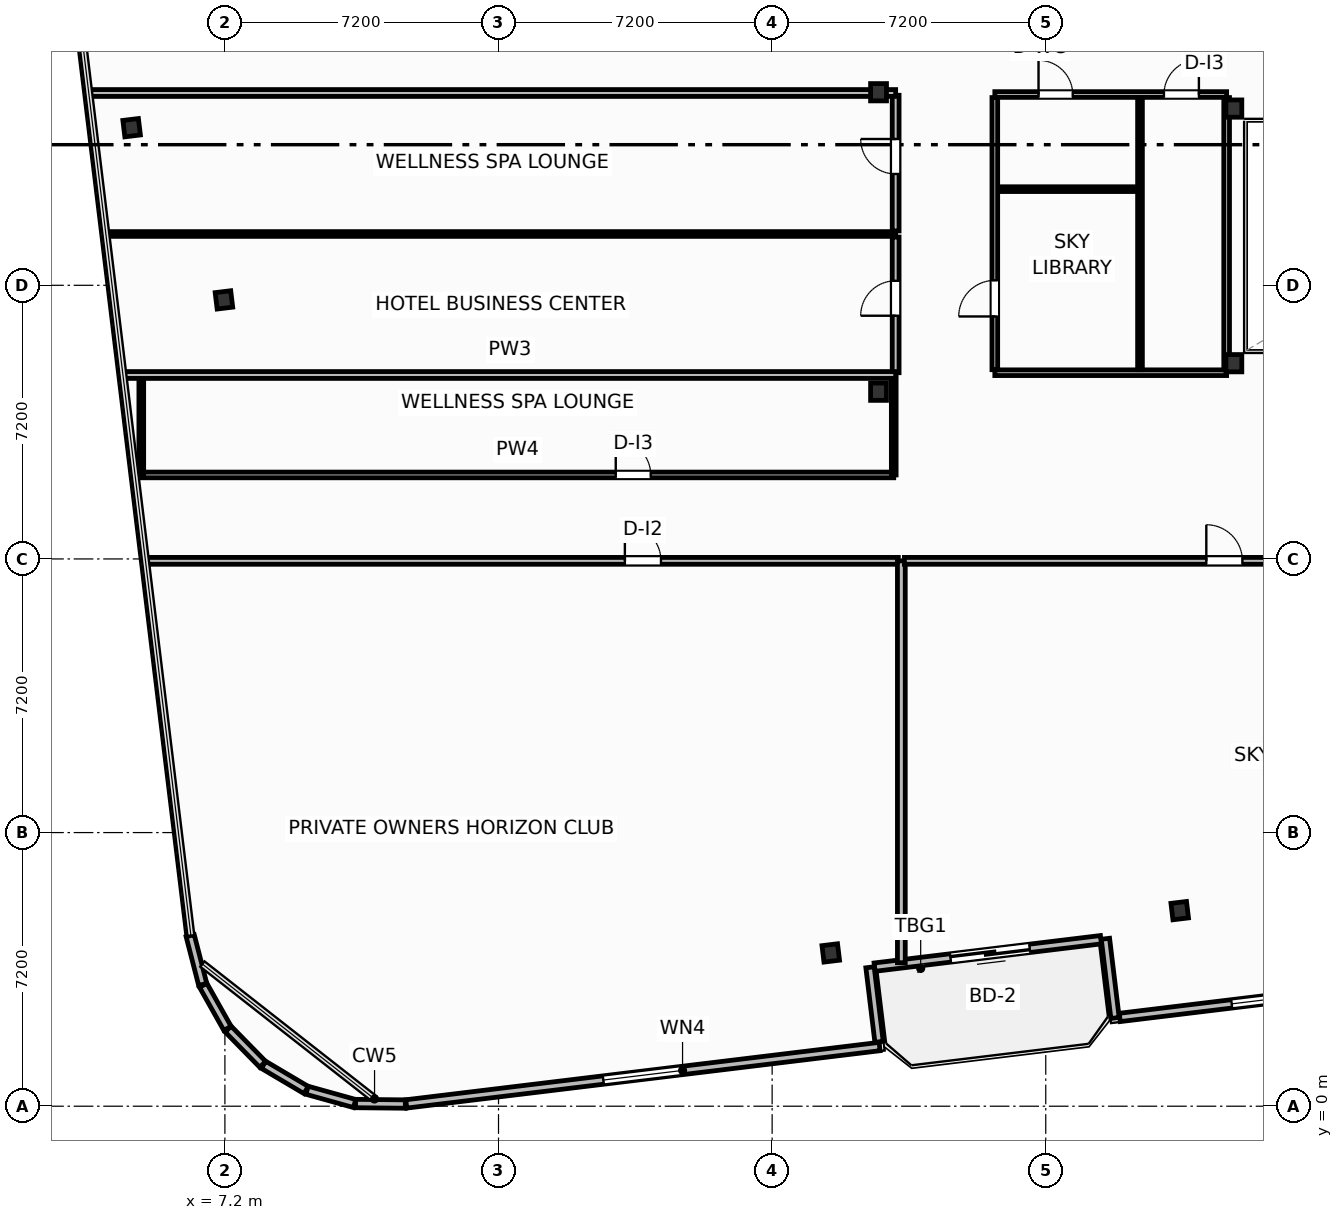
"""IFC4 building model, lengths in metres.
Left out: names, types, materials, properties, quantities, classifications, styles, units other than length and angle.
Written with IfcOpenShell. Run it as: python <this file> out.ifc"""

import sys

from ifc_helpers import new_model, si_unit, direction, frame, frame_2d, origin, origin_2d, place, context, subcontext, project, spatial, rectangle, i_section, extrude, element, fill, save


model = new_model("IFC4")
c1 = context("Model", 3, precision=1e-05, world=origin(), true_north=direction((0.0, 1.0)))
c2 = subcontext(c1, "Body", "Model", "MODEL_VIEW")
j1 = project(units=[si_unit("LENGTHUNIT", "METRE"), si_unit("PLANEANGLEUNIT", "RADIAN")], contexts=[c1])
p1 = place(None, origin())
s1 = spatial("IfcSite", under=j1, at=p1, CompositionType="ELEMENT")
p2 = place(p1, origin())
s2 = spatial("IfcBuilding", under=s1, at=p2, CompositionType="ELEMENT")
p3 = place(p2, frame((0.0, 0.0, 182.0)))
s3 = spatial("IfcBuildingStorey", under=s2, at=p3, CompositionType="ELEMENT", Elevation=182.0)
for number, where, z_axis, x_axis in (
    (1, (33.75, 19.55, 0.0), (0.0, 0.0, 1.0), (1.0, 0.0, 0.0)),
    (2, (33.75, 26.25, 0.0), (0.0, 0.0, 1.0), (1.0, 0.0, 0.0)),
    (3, (24.4, 18.8, 0.0), (0.0, 0.0, 1.0), (1.0, 0.0, 0.0)),
    (4, (24.4, 26.68, 0.0), (0.0, 0.0, 1.0), (1.0, 0.0, 0.0)),
):
    element("IfcColumn", number, at=place(p3, frame(where, z_axis=z_axis, x_axis=x_axis)), inside=s3, PredefinedType="COLUMN", context=c2, shape_type="SweptSolid", body=[
        extrude(i_section(OverallWidth=0.418, OverallDepth=0.455, WebThickness=0.042, FlangeThickness=0.068, FilletRadius=0.025, at=origin_2d()), origin(), (0.0, 0.0, 1.0), 3.7),
    ])
for number, where, z_axis, x_axis in (
    (5, (23.143, 4.033, 0.0), (0.0, 0.0, 1.0), (0.993, 0.12, 0.0)),
    (6, (32.325, 5.146, 0.0), (0.0, 0.0, 1.0), (0.993, 0.12, 0.0)),
    (7, (4.746, 25.747, 0.0), (0.0, 0.0, 1.0), (0.993, 0.12, 0.0)),
    (8, (7.175, 21.216, 0.0), (0.0, 0.0, 1.0), (0.993, 0.12, 0.0)),
):
    element("IfcColumn", number, at=place(p3, frame(where, z_axis=z_axis, x_axis=x_axis)), inside=s3, PredefinedType="COLUMN", context=c2, shape_type="SweptSolid", body=[
        extrude(i_section(OverallWidth=0.412, OverallDepth=0.435, WebThickness=0.036, FlangeThickness=0.057, FilletRadius=0.025, at=origin_2d()), origin(), (0.0, 0.0, 1.0), 3.7),
    ])
p4 = place(p3, frame((30.252, 4.381, 0.0), z_axis=(0.0, 0.0, 1.0), x_axis=(-0.992735402148, -0.120318000826, 0.0)))
e9 = element("IfcWall", 9, at=p4, inside=s3, PredefinedType="SOLIDWALL", context=c2, shape_type="SweptSolid", body=[
    extrude(rectangle(XDim=6.0, YDim=0.22, at=frame_2d((3.0, 0.0))), origin(), (0.0, 0.0, 1.0), 2.73),
])
p5 = place(p4, frame((1.888, 0.0, 0.0)))
e10 = element("IfcOpeningElement", 10, at=p5, cuts=e9, PredefinedType="OPENING", context=c2, shape_type="SweptSolid", body=[
    extrude(rectangle(XDim=2.1, YDim=2.3, at=frame_2d((1.05, 1.15))), frame((0.0, 0.12, 0.0), z_axis=(0.0, -1.0, 0.0), x_axis=(1.0, 0.0, 0.0)), (0.0, 0.0, 1.0), 0.24),
])
p6 = place(p3, frame((6.286, 4.488, 0.0), z_axis=(0.0, 0.0, 1.0), x_axis=(0.248942347653, -0.968518305219, 0.0)))
e11 = element("IfcWall", 11, at=p6, inside=s3, PredefinedType="SOLIDWALL", context=c2, shape_type="SweptSolid", body=[
    extrude(rectangle(XDim=1.326, YDim=0.22, at=frame_2d((0.663, 0.0))), origin(), (0.0, 0.0, 1.0), 2.73),
])
for number, where, z_axis, x_axis in (
    (12, (6.629, 3.182, 0.0), (0.0, 0.0, 1.0), (0.491, -0.871, 0.0)),
    (13, (7.285, 2.031, 0.0), (0.0, 0.0, 1.0), (0.7, -0.714, 0.0)),
    (14, (8.217, 1.089, 0.0), (0.0, 0.0, 1.0), (0.861, -0.509, 0.0)),
):
    element("IfcWall", number, at=place(p3, frame(where, z_axis=z_axis, x_axis=x_axis)), inside=s3, PredefinedType="SOLIDWALL", context=c2, shape_type="SweptSolid", body=[
        extrude(rectangle(XDim=1.301, YDim=0.22, at=frame_2d((0.65, 0.0))), origin(), (0.0, 0.0, 1.0), 2.73),
    ])
p7 = place(p3, frame((9.361, 0.42, 0.0), z_axis=(0.0, 0.0, 1.0), x_axis=(0.963218895288, -0.268717992997, 0.0)))
e15 = element("IfcWall", 15, at=p7, inside=s3, PredefinedType="SOLIDWALL", context=c2, shape_type="SweptSolid", body=[
    extrude(rectangle(XDim=1.301, YDim=0.22, at=frame_2d((0.65, 0.0))), origin(), (0.0, 0.0, 1.0), 2.73),
])
p8 = place(p3, frame((10.639, 0.07, 0.0), z_axis=(0.0, 0.0, 1.0), x_axis=(0.999947377741, -0.010258740119, 0.0)))
e16 = element("IfcWall", 16, at=p8, inside=s3, PredefinedType="SOLIDWALL", context=c2, shape_type="SweptSolid", body=[
    extrude(rectangle(XDim=1.309, YDim=0.22, at=frame_2d((0.654, 0.0))), origin(), (0.0, 0.0, 1.0), 2.73),
])
p9 = place(p3, frame((11.972, 0.06, 0.0), z_axis=(0.0, 0.0, 1.0), x_axis=(0.992732021049, 0.120345894751, 0.0)))
e17 = element("IfcWall", 17, at=p9, inside=s3, PredefinedType="SOLIDWALL", context=c2, shape_type="SweptSolid", body=[
    extrude(rectangle(XDim=12.547, YDim=0.22, at=frame_2d((6.274, 0.0))), origin(), (0.0, 0.0, 1.0), 2.73),
])
p10 = place(p9, frame((5.224, 0.0, 0.8)))
e18 = element("IfcOpeningElement", 18, at=p10, cuts=e17, PredefinedType="OPENING", context=c2, shape_type="SweptSolid", body=[
    extrude(rectangle(XDim=2.1, YDim=1.75, at=frame_2d((1.05, 0.875))), frame((0.0, 0.12, 0.0), z_axis=(0.0, -1.0, 0.0), x_axis=(1.0, 0.0, 0.0)), (0.0, 0.0, 1.0), 0.24),
])
p11 = place(p3, frame((24.413, 1.694, 0.0), z_axis=(0.0, 0.0, 1.0), x_axis=(-0.120290754542, 0.992738703976, 0.0)))
e19 = element("IfcWall", 19, at=p11, inside=s3, PredefinedType="SOLIDWALL", context=c2, shape_type="SweptSolid", body=[
    extrude(rectangle(XDim=1.975, YDim=0.22, at=frame_2d((0.987, 0.0))), origin(), (0.0, 0.0, 1.0), 2.73),
])
p12 = place(p3, frame((30.37, 4.406, 0.0), z_axis=(0.0, 0.0, 1.0), x_axis=(0.120327895535, -0.992734202874, 0.0)))
e20 = element("IfcWall", 20, at=p12, inside=s3, PredefinedType="SOLIDWALL", context=c2, shape_type="SweptSolid", body=[
    extrude(rectangle(XDim=2.1, YDim=0.22, at=frame_2d((1.05, 0.0))), origin(), (0.0, 0.0, 1.0), 2.73),
])
p13 = place(p3, frame((30.747, 2.336, 0.0), z_axis=(0.0, 0.0, 1.0), x_axis=(0.992731032022, 0.120354052946, 0.0)))
e21 = element("IfcWall", 21, at=p13, inside=s3, PredefinedType="SOLIDWALL", context=c2, shape_type="SweptSolid", body=[
    extrude(rectangle(XDim=8.035, YDim=0.22, at=frame_2d((4.018, 0.0))), origin(), (0.0, 0.0, 1.0), 2.73),
])
p14 = place(p13, frame((2.968, 0.0, 0.8)))
e22 = element("IfcOpeningElement", 22, at=p14, cuts=e21, PredefinedType="OPENING", context=c2, shape_type="SweptSolid", body=[
    extrude(rectangle(XDim=2.1, YDim=1.75, at=frame_2d((1.05, 0.875))), frame((0.0, 0.12, 0.0), z_axis=(0.0, -1.0, 0.0), x_axis=(1.0, 0.0, 0.0)), (0.0, 0.0, 1.0), 0.24),
])
p15 = place(p3, frame((5.0, 16.61, 0.0), z_axis=(0.0, 0.0, 1.0), x_axis=(1.0, 0.0, 0.0)))
e23 = element("IfcWall", 23, at=p15, inside=s3, PredefinedType="PARTITIONING", context=c2, shape_type="SweptSolid", body=[
    extrude(rectangle(XDim=19.8, YDim=0.15, at=frame_2d((9.9, 0.0))), origin(), (0.0, 0.0, 1.0), 3.45),
])
p16 = place(p15, frame((12.485, 0.0, 0.0)))
e24 = element("IfcOpeningElement", 24, at=p16, cuts=e23, PredefinedType="OPENING", context=c2, shape_type="SweptSolid", body=[
    extrude(rectangle(XDim=0.92, YDim=2.05, at=frame_2d((0.46, 1.025))), frame((0.0, 0.085, 0.0), z_axis=(0.0, -1.0, 0.0), x_axis=(1.0, 0.0, 0.0)), (0.0, 0.0, 1.0), 0.17),
])
for number, where, z_axis, x_axis in (
    (25, (5.0, 16.61, 0.0), (0.0, 0.0, 1.0), (0.0, 1.0, 0.0)),
    (26, (24.8, 16.61, 0.0), (0.0, 0.0, 1.0), (0.0, 1.0, 0.0)),
):
    element("IfcWall", number, at=place(p3, frame(where, z_axis=z_axis, x_axis=x_axis)), inside=s3, PredefinedType="PARTITIONING", context=c2, shape_type="SweptSolid", body=[
        extrude(rectangle(XDim=2.63, YDim=0.125, at=frame_2d((1.315, 0.0))), origin(), (0.0, 0.0, 1.0), 3.45),
    ])
p17 = place(p3, frame((5.15, 14.35, 0.0), z_axis=(0.0, 0.0, 1.0), x_axis=(1.0, 0.0, 0.0)))
e27 = element("IfcWall", 27, at=p17, inside=s3, PredefinedType="PARTITIONING", context=c2, shape_type="SweptSolid", body=[
    extrude(rectangle(XDim=19.77, YDim=0.18, at=frame_2d((9.885, 0.0))), origin(), (0.0, 0.0, 1.0), 3.45),
])
p18 = place(p17, frame((12.575, 0.0, 0.0)))
e28 = element("IfcOpeningElement", 28, at=p18, cuts=e27, PredefinedType="OPENING", context=c2, shape_type="SweptSolid", body=[
    extrude(rectangle(XDim=0.95, YDim=2.05, at=frame_2d((0.475, 1.025))), frame((0.0, 0.1, 0.0), z_axis=(0.0, -1.0, 0.0), x_axis=(1.0, 0.0, 0.0)), (0.0, 0.0, 1.0), 0.2),
])
p19 = place(p3, frame((25.0, 3.775, 0.0), z_axis=(0.0, 0.0, 1.0), x_axis=(0.0, 1.0, 0.0)))
e29 = element("IfcWall", 29, at=p19, inside=s3, PredefinedType="PARTITIONING", context=c2, shape_type="SweptSolid", body=[
    extrude(rectangle(XDim=10.575, YDim=0.205, at=frame_2d((5.288, 0.0))), origin(), (0.0, 0.0, 1.0), 3.45),
])
p20 = place(p3, frame((25.08, 14.35, 0.0), z_axis=(0.0, 0.0, 1.0), x_axis=(1.0, 0.0, 0.0)))
e30 = element("IfcWall", 30, at=p20, inside=s3, PredefinedType="PARTITIONING", context=c2, shape_type="SweptSolid", body=[
    extrude(rectangle(XDim=16.84, YDim=0.18, at=frame_2d((8.42, 0.0))), origin(), (0.0, 0.0, 1.0), 3.45),
])
p21 = place(p20, frame((7.945, 0.0, 0.0)))
e31 = element("IfcOpeningElement", 31, at=p21, cuts=e30, PredefinedType="OPENING", context=c2, shape_type="SweptSolid", body=[
    extrude(rectangle(XDim=0.95, YDim=2.05, at=frame_2d((0.475, 1.025))), frame((0.0, 0.1, 0.0), z_axis=(0.0, -1.0, 0.0), x_axis=(1.0, 0.0, 0.0)), (0.0, 0.0, 1.0), 0.2),
])
p22 = place(p3, frame((24.85, 19.3, 0.0), z_axis=(0.0, 0.0, 1.0), x_axis=(0.0, 1.0, 0.0)))
e32 = element("IfcWall", 32, at=p22, inside=s3, PredefinedType="PARTITIONING", context=c2, shape_type="SweptSolid", body=[
    extrude(rectangle(XDim=3.57, YDim=0.18, at=frame_2d((1.785, 0.0))), origin(), (0.0, 0.0, 1.0), 3.45),
])
p23 = place(p22, frame((1.5, 0.0, 0.0)))
e33 = element("IfcOpeningElement", 33, at=p23, cuts=e32, PredefinedType="OPENING", context=c2, shape_type="SweptSolid", body=[
    extrude(rectangle(XDim=0.92, YDim=2.05, at=frame_2d((0.46, 1.025))), frame((0.0, 0.1, 0.0), z_axis=(0.0, -1.0, 0.0), x_axis=(1.0, 0.0, 0.0)), (0.0, 0.0, 1.0), 0.2),
])
p24 = place(p3, frame((24.85, 23.03, 0.0), z_axis=(0.0, 0.0, 1.0), x_axis=(0.0, 1.0, 0.0)))
e34 = element("IfcWall", 34, at=p24, inside=s3, PredefinedType="PARTITIONING", context=c2, shape_type="SweptSolid", body=[
    extrude(rectangle(XDim=3.57, YDim=0.18, at=frame_2d((1.785, 0.0))), origin(), (0.0, 0.0, 1.0), 3.45),
])
p25 = place(p24, frame((1.5, 0.0, 0.0)))
e35 = element("IfcOpeningElement", 35, at=p25, cuts=e34, PredefinedType="OPENING", context=c2, shape_type="SweptSolid", body=[
    extrude(rectangle(XDim=0.92, YDim=2.05, at=frame_2d((0.46, 1.025))), frame((0.0, 0.1, 0.0), z_axis=(0.0, -1.0, 0.0), x_axis=(1.0, 0.0, 0.0)), (0.0, 0.0, 1.0), 0.2),
])
p26 = place(p3, frame((4.107, 22.95, 0.0), z_axis=(0.0, 0.0, 1.0), x_axis=(1.0, 0.0, 0.0)))
e36 = element("IfcWall", 36, at=p26, inside=s3, PredefinedType="PARTITIONING", context=c2, shape_type="SweptSolid", body=[
    extrude(rectangle(XDim=20.743, YDim=0.125, at=frame_2d((10.371, 0.0))), origin(), (0.0, 0.0, 1.0), 2.662),
])
p27 = place(p3, frame((4.557, 19.24, 0.0), z_axis=(0.0, 0.0, 1.0), x_axis=(1.0, 0.0, 0.0)))
e37 = element("IfcWall", 37, at=p27, inside=s3, PredefinedType="PARTITIONING", context=c2, shape_type="SweptSolid", body=[
    extrude(rectangle(XDim=20.293, YDim=0.18, at=frame_2d((10.146, 0.0))), origin(), (0.0, 0.0, 1.0), 3.45),
])
p28 = place(p3, frame((3.658, 26.66, 0.0), z_axis=(0.0, 0.0, 1.0), x_axis=(1.0, 0.0, 0.0)))
e38 = element("IfcWall", 38, at=p28, inside=s3, PredefinedType="PARTITIONING", context=c2, shape_type="SweptSolid", body=[
    extrude(rectangle(XDim=21.192, YDim=0.18, at=frame_2d((10.596, 0.0))), origin(), (0.0, 0.0, 1.0), 2.662),
])
p29 = place(p3, frame((27.46, 19.3, 0.0), z_axis=(0.0, 0.0, 1.0), x_axis=(1.0, 0.0, 0.0)))
e39 = element("IfcWall", 39, at=p29, inside=s3, PredefinedType="PARTITIONING", context=c2, shape_type="SweptSolid", body=[
    extrude(rectangle(XDim=6.1, YDim=0.15, at=frame_2d((3.05, 0.0))), origin(), (0.0, 0.0, 1.0), 2.662),
])
p30 = place(p3, frame((27.46, 26.62, 0.0), z_axis=(0.0, 0.0, 1.0), x_axis=(1.0, 0.0, 0.0)))
e40 = element("IfcWall", 40, at=p30, inside=s3, PredefinedType="PARTITIONING", context=c2, shape_type="SweptSolid", body=[
    extrude(rectangle(XDim=6.1, YDim=0.15, at=frame_2d((3.05, 0.0))), origin(), (0.0, 0.0, 1.0), 2.662),
])
p31 = place(p30, frame((1.15, 0.0, 0.0)))
e41 = element("IfcOpeningElement", 41, at=p31, cuts=e40, PredefinedType="OPENING", context=c2, shape_type="SweptSolid", body=[
    extrude(rectangle(XDim=0.9, YDim=2.05, at=frame_2d((0.45, 1.025))), frame((0.0, 0.085, 0.0), z_axis=(0.0, -1.0, 0.0), x_axis=(1.0, 0.0, 0.0)), (0.0, 0.0, 1.0), 0.17),
])
p32 = place(p30, frame((4.45, 0.0, 0.0)))
e42 = element("IfcOpeningElement", 42, at=p32, cuts=e40, PredefinedType="OPENING", context=c2, shape_type="SweptSolid", body=[
    extrude(rectangle(XDim=0.92, YDim=2.05, at=frame_2d((0.46, 1.025))), frame((0.0, 0.085, 0.0), z_axis=(0.0, -1.0, 0.0), x_axis=(1.0, 0.0, 0.0)), (0.0, 0.0, 1.0), 0.17),
])
p33 = place(p3, frame((31.28, 19.38, 0.0), z_axis=(0.0, 0.0, 1.0), x_axis=(0.0, 1.0, 0.0)))
e43 = element("IfcWall", 43, at=p33, inside=s3, PredefinedType="PARTITIONING", context=c2, shape_type="SweptSolid", body=[
    extrude(rectangle(XDim=7.16, YDim=0.125, at=frame_2d((3.58, 0.0))), origin(), (0.0, 0.0, 1.0), 3.45),
])
p34 = place(p3, frame((27.52, 24.13, 0.0), z_axis=(0.0, 0.0, 1.0), x_axis=(1.0, 0.0, 0.0)))
e44 = element("IfcWall", 44, at=p34, inside=s3, PredefinedType="PARTITIONING", context=c2, shape_type="SweptSolid", body=[
    extrude(rectangle(XDim=3.7, YDim=0.125, at=frame_2d((1.85, 0.0))), origin(), (0.0, 0.0, 1.0), 3.45),
])
p35 = place(p3, frame((27.46, 19.38, 0.0), z_axis=(0.0, 0.0, 1.0), x_axis=(0.0, 1.0, 0.0)))
e45 = element("IfcWall", 45, at=p35, inside=s3, PredefinedType="PARTITIONING", context=c2, shape_type="SweptSolid", body=[
    extrude(rectangle(XDim=7.16, YDim=0.15, at=frame_2d((3.58, 0.0))), origin(), (0.0, 0.0, 1.0), 3.45),
])
p36 = place(p35, frame((1.4, 0.0, 0.0)))
e46 = element("IfcOpeningElement", 46, at=p36, cuts=e45, PredefinedType="OPENING", context=c2, shape_type="SweptSolid", body=[
    extrude(rectangle(XDim=0.95, YDim=2.05, at=frame_2d((0.475, 1.025))), frame((0.0, 0.085, 0.0), z_axis=(0.0, -1.0, 0.0), x_axis=(1.0, 0.0, 0.0)), (0.0, 0.0, 1.0), 0.17),
])
p37 = place(p3, frame((33.56, 19.38, 0.0), z_axis=(0.0, 0.0, 1.0), x_axis=(0.0, 1.0, 0.0)))
e47 = element("IfcWall", 47, at=p37, inside=s3, PredefinedType="PARTITIONING", context=c2, shape_type="SweptSolid", body=[
    extrude(rectangle(XDim=7.16, YDim=0.15, at=frame_2d((3.58, 0.0))), origin(), (0.0, 0.0, 1.0), 2.824),
])
p38 = place(p5, origin())
e48 = element("IfcDoor", 48, at=p38, inside=s3, OperationType="SLIDING_TO_LEFT", PredefinedType="DOOR", context=c2, shape_type="SweptSolid", body=[
    extrude(rectangle(XDim=2.1, YDim=2.3, at=frame_2d((1.05, 1.15))), frame((0.0, 0.025, 0.0), z_axis=(0.0, -1.0, 0.0), x_axis=(1.0, 0.0, 0.0)), (0.0, 0.0, 1.0), 0.05),
])
fill(e10, e48)
p39 = place(p10, origin())
e49 = element("IfcWindow", 49, at=p39, inside=s3, PartitioningType="SINGLE_PANEL", PredefinedType="WINDOW", context=c2, shape_type="SweptSolid", body=[
    extrude(rectangle(XDim=2.1, YDim=1.75, at=frame_2d((1.05, 0.875))), frame((0.0, 0.03, 0.0), z_axis=(0.0, -1.0, 0.0), x_axis=(1.0, 0.0, 0.0)), (0.0, 0.0, 1.0), 0.06),
])
fill(e18, e49)
p40 = place(p14, origin())
e50 = element("IfcWindow", 50, at=p40, inside=s3, PartitioningType="SINGLE_PANEL", PredefinedType="WINDOW", context=c2, shape_type="SweptSolid", body=[
    extrude(rectangle(XDim=2.1, YDim=1.75, at=frame_2d((1.05, 0.875))), frame((0.0, 0.03, 0.0), z_axis=(0.0, -1.0, 0.0), x_axis=(1.0, 0.0, 0.0)), (0.0, 0.0, 1.0), 0.06),
])
fill(e22, e50)
p41 = place(p16, origin())
e51 = element("IfcDoor", 51, at=p41, inside=s3, OperationType="SINGLE_SWING_LEFT", PredefinedType="DOOR", context=c2, shape_type="SweptSolid", body=[
    extrude(rectangle(XDim=0.92, YDim=2.05, at=frame_2d((0.46, 1.025))), frame((0.0, 0.025, 0.0), z_axis=(0.0, -1.0, 0.0), x_axis=(1.0, 0.0, 0.0)), (0.0, 0.0, 1.0), 0.05),
])
fill(e24, e51)
p42 = place(p18, origin())
e52 = element("IfcDoor", 52, at=p42, inside=s3, OperationType="SINGLE_SWING_LEFT", PredefinedType="DOOR", context=c2, shape_type="SweptSolid", body=[
    extrude(rectangle(XDim=0.95, YDim=2.05, at=frame_2d((0.475, 1.025))), frame((0.0, 0.025, 0.0), z_axis=(0.0, -1.0, 0.0), x_axis=(1.0, 0.0, 0.0)), (0.0, 0.0, 1.0), 0.05),
])
fill(e28, e52)
p43 = place(p21, origin())
e53 = element("IfcDoor", 53, at=p43, inside=s3, OperationType="SINGLE_SWING_LEFT", PredefinedType="DOOR", context=c2, shape_type="SweptSolid", body=[
    extrude(rectangle(XDim=0.95, YDim=2.05, at=frame_2d((0.475, 1.025))), frame((0.0, 0.025, 0.0), z_axis=(0.0, -1.0, 0.0), x_axis=(1.0, 0.0, 0.0)), (0.0, 0.0, 1.0), 0.05),
])
fill(e31, e53)
p44 = place(p23, origin())
e54 = element("IfcDoor", 54, at=p44, inside=s3, OperationType="SINGLE_SWING_LEFT", PredefinedType="DOOR", context=c2, shape_type="SweptSolid", body=[
    extrude(rectangle(XDim=0.92, YDim=2.05, at=frame_2d((0.46, 1.025))), frame((0.0, 0.025, 0.0), z_axis=(0.0, -1.0, 0.0), x_axis=(1.0, 0.0, 0.0)), (0.0, 0.0, 1.0), 0.05),
])
fill(e33, e54)
p45 = place(p25, origin())
e55 = element("IfcDoor", 55, at=p45, inside=s3, OperationType="SINGLE_SWING_RIGHT", PredefinedType="DOOR", context=c2, shape_type="SweptSolid", body=[
    extrude(rectangle(XDim=0.92, YDim=2.05, at=frame_2d((0.46, 1.025))), frame((0.0, 0.025, 0.0), z_axis=(0.0, -1.0, 0.0), x_axis=(1.0, 0.0, 0.0)), (0.0, 0.0, 1.0), 0.05),
])
fill(e35, e55)
p46 = place(p31, origin())
e56 = element("IfcDoor", 56, at=p46, inside=s3, OperationType="SINGLE_SWING_LEFT", PredefinedType="DOOR", context=c2, shape_type="SweptSolid", body=[
    extrude(rectangle(XDim=0.9, YDim=2.05, at=frame_2d((0.45, 1.025))), frame((0.0, 0.025, 0.0), z_axis=(0.0, -1.0, 0.0), x_axis=(1.0, 0.0, 0.0)), (0.0, 0.0, 1.0), 0.05),
])
fill(e41, e56)
p47 = place(p32, origin())
e57 = element("IfcDoor", 57, at=p47, inside=s3, OperationType="SINGLE_SWING_RIGHT", PredefinedType="DOOR", context=c2, shape_type="SweptSolid", body=[
    extrude(rectangle(XDim=0.92, YDim=2.05, at=frame_2d((0.46, 1.025))), frame((0.0, 0.025, 0.0), z_axis=(0.0, -1.0, 0.0), x_axis=(1.0, 0.0, 0.0)), (0.0, 0.0, 1.0), 0.05),
])
fill(e42, e57)
p48 = place(p36, origin())
e58 = element("IfcDoor", 58, at=p48, inside=s3, OperationType="SINGLE_SWING_LEFT", PredefinedType="DOOR", context=c2, shape_type="SweptSolid", body=[
    extrude(rectangle(XDim=0.95, YDim=2.05, at=frame_2d((0.475, 1.025))), frame((0.0, 0.025, 0.0), z_axis=(0.0, -1.0, 0.0), x_axis=(1.0, 0.0, 0.0)), (0.0, 0.0, 1.0), 0.05),
])
fill(e46, e58)
save(model, sys.argv[1])
